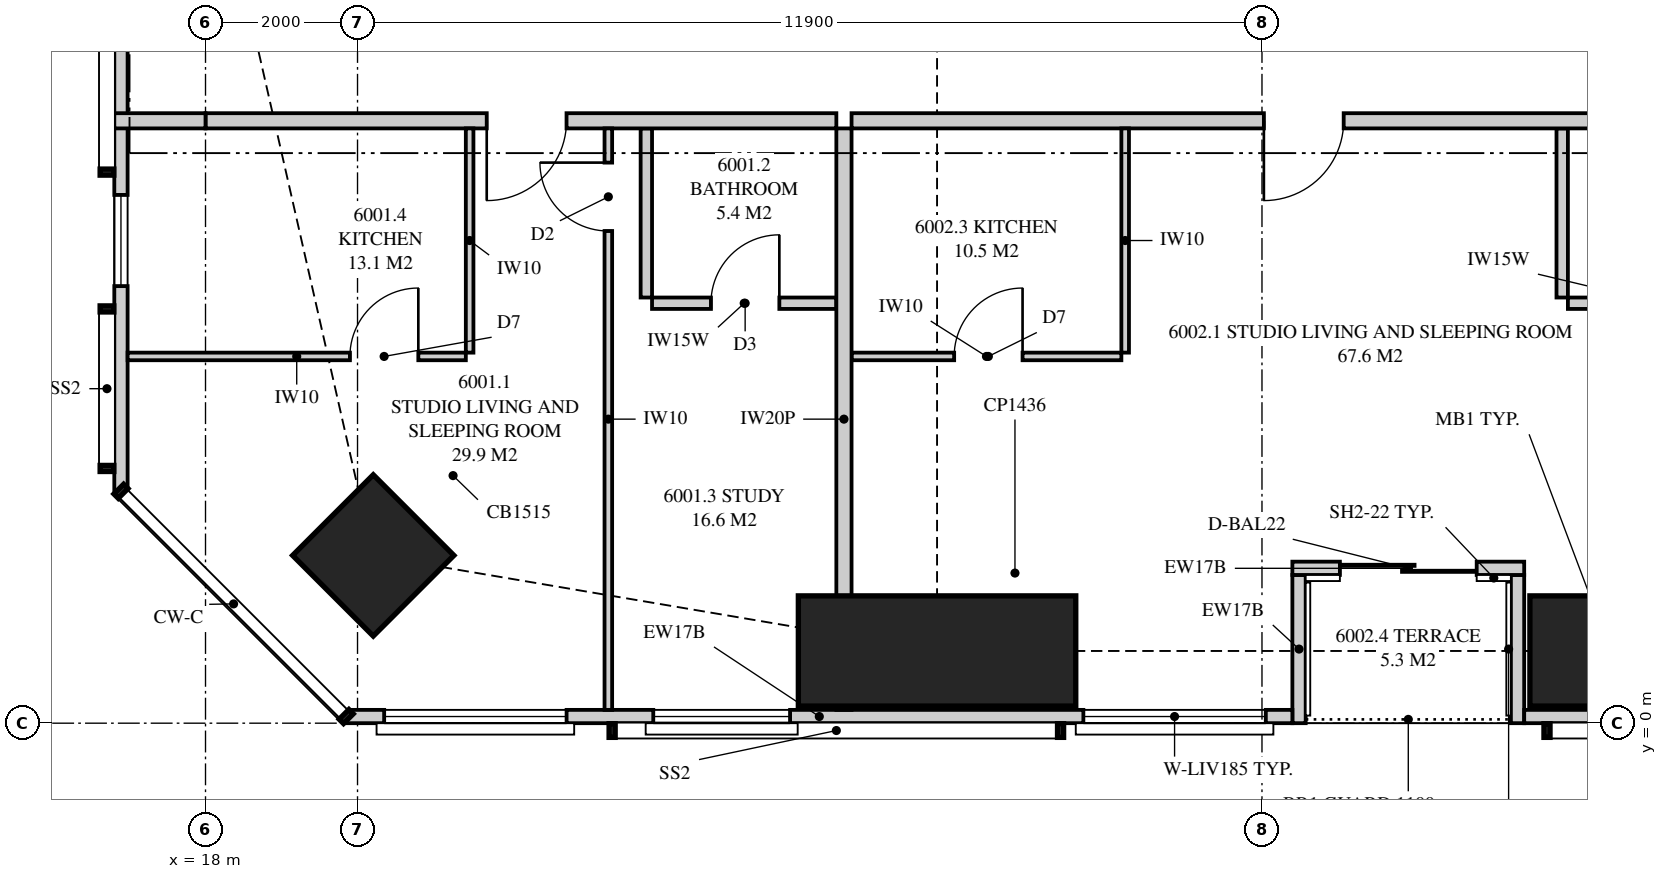
"""IFC4 building model, lengths in metres.
Left out: names, types, materials, properties, quantities, classifications, styles, units other than length and angle.
Written with IfcOpenShell. Run it as: python <this file> out.ifc"""

import sys

from ifc_helpers import new_model, si_unit, direction, frame, frame_2d, origin, origin_2d, place, context, subcontext, project, spatial, polyline, rectangle, hollow_rectangle, outline, extrude, element, fill, save


model = new_model("IFC4")
c1 = context("Model", 3, precision=1e-05, world=origin(), true_north=direction((0.0, 1.0)))
c2 = subcontext(c1, "Body", "Model", "MODEL_VIEW")
j1 = project(units=[si_unit("LENGTHUNIT", "METRE"), si_unit("PLANEANGLEUNIT", "RADIAN")], contexts=[c1])
p1 = place(None, origin())
s1 = spatial("IfcSite", under=j1, at=p1, CompositionType="ELEMENT")
p2 = place(p1, origin())
s2 = spatial("IfcBuilding", under=s1, at=p2, CompositionType="ELEMENT")
p3 = place(p2, frame((0.0, 0.0, 221.45)))
s3 = spatial("IfcBuildingStorey", under=s2, at=p3, CompositionType="ELEMENT", Elevation=221.45)
p4 = place(p3, frame((20.207, 2.207, 0.0), z_axis=(0.0, 0.0, 1.0), x_axis=(0.707106781187, 0.707106781187, 0.0)))
e1 = element("IfcColumn", 1, at=p4, inside=s3, PredefinedType="COLUMN", context=c2, shape_type="SweptSolid", body=[
    extrude(hollow_rectangle(XDim=1.5, YDim=1.5, WallThickness=0.125, at=origin_2d()), origin(), (0.0, 0.0, 1.0), 3.5),
])
for number, where, z_axis, x_axis in (
    (2, (27.625, 0.95, 0.0), (0.0, 0.0, 1.0), (0.0, 1.0, 0.0)),
    (3, (37.25, 0.95, 0.0), (0.0, 0.0, 1.0), (0.0, 1.0, 0.0)),
):
    element("IfcColumn", number, at=place(p3, frame(where, z_axis=z_axis, x_axis=x_axis)), inside=s3, PredefinedType="COLUMN", context=c2, shape_type="SweptSolid", body=[
        extrude(rectangle(XDim=1.45, YDim=3.65, at=origin_2d()), origin(), (0.0, 0.0, 1.0), 3.5),
    ])
p5 = place(p3, frame((19.851, 0.087, 0.0), z_axis=(0.0, 0.0, 1.0), x_axis=(1.0, 0.0, 0.0)))
e4 = element("IfcWall", 4, at=p5, inside=s3, PredefinedType="SOLIDWALL", context=c2, shape_type="SweptSolid", body=[
    extrude(outline(polyline([(0.0, 0.0), (12.449, 0.0), (12.449, 2.3), (7.774, 2.3), (7.774, 3.26), (7.642, 3.26), (7.642, 2.3), (7.559, 2.3), (7.559, 3.26), (0.0, 3.26), (0.0, 0.0)])), frame((0.0, 0.087, 0.0), z_axis=(0.0, -1.0, 0.0), x_axis=(1.0, 0.0, 0.0)), (0.0, 0.0, 1.0), 0.175),
])
p6 = place(p5, frame((0.5, 0.0, 0.4)))
e5 = element("IfcOpeningElement", 5, at=p6, cuts=e4, PredefinedType="OPENING", context=c2, shape_type="SweptSolid", body=[
    extrude(rectangle(XDim=2.4, YDim=1.85, at=frame_2d((1.2, 0.925))), frame((0.0, 0.097, 0.0), z_axis=(0.0, -1.0, 0.0), x_axis=(1.0, 0.0, 0.0)), (0.0, 0.0, 1.0), 0.195),
])
p7 = place(p5, frame((4.04, 0.0, 0.4)))
e6 = element("IfcOpeningElement", 6, at=p7, cuts=e4, PredefinedType="OPENING", context=c2, shape_type="SweptSolid", body=[
    extrude(rectangle(XDim=1.8, YDim=1.85, at=frame_2d((0.9, 0.925))), frame((0.0, 0.097, 0.0), z_axis=(0.0, -1.0, 0.0), x_axis=(1.0, 0.0, 0.0)), (0.0, 0.0, 1.0), 0.195),
])
p8 = place(p5, frame((9.699, 0.0, 0.4)))
e7 = element("IfcOpeningElement", 7, at=p8, cuts=e4, PredefinedType="OPENING", context=c2, shape_type="SweptSolid", body=[
    extrude(rectangle(XDim=2.4, YDim=1.85, at=frame_2d((1.2, 0.925))), frame((0.0, 0.097, 0.0), z_axis=(0.0, -1.0, 0.0), x_axis=(1.0, 0.0, 0.0)), (0.0, 0.0, 1.0), 0.195),
])
p9 = place(p3, frame((35.35, 0.087, 0.0), z_axis=(0.0, 0.0, 1.0), x_axis=(1.0, 0.0, 0.0)))
e8 = element("IfcWall", 8, at=p9, inside=s3, PredefinedType="SOLIDWALL", context=c2, shape_type="SweptSolid", body=[
    extrude(outline(polyline([(0.0, 0.0), (18.099, 0.0), (18.099, 3.26), (11.74, 3.26), (11.74, 2.3), (11.656, 2.3), (11.656, 3.26), (11.525, 3.26), (11.525, 2.3), (0.0, 2.3), (0.0, 0.0)])), frame((0.0, 0.087, 0.0), z_axis=(0.0, -1.0, 0.0), x_axis=(1.0, 0.0, 0.0)), (0.0, 0.0, 1.0), 0.175),
])
p10 = place(p9, frame((4.0, 0.0, 0.4)))
e9 = element("IfcOpeningElement", 9, at=p10, cuts=e8, PredefinedType="OPENING", context=c2, shape_type="SweptSolid", body=[
    extrude(rectangle(XDim=1.8, YDim=1.85, at=frame_2d((0.9, 0.925))), frame((0.0, 0.097, 0.0), z_axis=(0.0, -1.0, 0.0), x_axis=(1.0, 0.0, 0.0)), (0.0, 0.0, 1.0), 0.195),
])
p11 = place(p9, frame((7.6, 0.0, 0.4)))
e10 = element("IfcOpeningElement", 10, at=p11, cuts=e8, PredefinedType="OPENING", context=c2, shape_type="SweptSolid", body=[
    extrude(rectangle(XDim=1.8, YDim=1.85, at=frame_2d((0.9, 0.925))), frame((0.0, 0.097, 0.0), z_axis=(0.0, -1.0, 0.0), x_axis=(1.0, 0.0, 0.0)), (0.0, 0.0, 1.0), 0.195),
])
p12 = place(p9, frame((13.51, 0.0, 0.4)))
e11 = element("IfcOpeningElement", 11, at=p12, cuts=e8, PredefinedType="OPENING", context=c2, shape_type="SweptSolid", body=[
    extrude(rectangle(XDim=2.4, YDim=1.85, at=frame_2d((1.2, 0.925))), frame((0.0, 0.097, 0.0), z_axis=(0.0, -1.0, 0.0), x_axis=(1.0, 0.0, 0.0)), (0.0, 0.0, 1.0), 0.195),
])
p13 = place(p3, frame((32.3, 2.038, 0.0), z_axis=(0.0, 0.0, 1.0), x_axis=(1.0, 0.0, 0.0)))
e12 = element("IfcWall", 12, at=p13, inside=s3, PredefinedType="SOLIDWALL", context=c2, shape_type="SweptSolid", body=[
    extrude(rectangle(XDim=3.05, YDim=0.175, at=frame_2d((1.525, 0.0))), origin(), (0.0, 0.0, 1.0), 3.26),
])
p14 = place(p13, frame((0.625, 0.0, 0.0)))
e13 = element("IfcOpeningElement", 13, at=p14, cuts=e12, PredefinedType="OPENING", context=c2, shape_type="SweptSolid", body=[
    extrude(rectangle(XDim=1.8, YDim=2.25, at=frame_2d((0.9, 1.125))), frame((0.0, 0.097, 0.0), z_axis=(0.0, -1.0, 0.0), x_axis=(1.0, 0.0, 0.0)), (0.0, 0.0, 1.0), 0.195),
])
for number, where, z_axis, x_axis in (
    (14, (32.387, 0.0, 0.0), (0.0, 0.0, 1.0), (0.0, 1.0, 0.0)),
    (15, (35.262, 0.0, 0.0), (0.0, 0.0, 1.0), (0.0, 1.0, 0.0)),
):
    element("IfcWall", number, at=place(p3, frame(where, z_axis=z_axis, x_axis=x_axis)), inside=s3, PredefinedType="SOLIDWALL", context=c2, shape_type="SweptSolid", body=[
        extrude(outline(polyline([(0.0, 0.0), (1.95, 0.0), (1.95, 3.26), (1.75, 3.26), (1.75, 2.3), (0.15, 2.3), (0.15, 3.26), (0.0, 3.26), (0.0, 0.0)])), frame((0.0, 0.087, 0.0), z_axis=(0.0, -1.0, 0.0), x_axis=(1.0, 0.0, 0.0)), (0.0, 0.0, 1.0), 0.175),
    ])
p15 = place(p3, frame((16.887, 30.949, 0.0), z_axis=(0.0, 0.0, 1.0), x_axis=(0.0, -1.0, 0.0)))
e16 = element("IfcWall", 16, at=p15, inside=s3, PredefinedType="SOLIDWALL", context=c2, shape_type="SweptSolid", body=[
    extrude(outline(polyline([(0.0, 0.0), (27.897, 0.0), (27.897, 3.26), (18.148, 3.26), (18.148, 2.3), (18.125, 2.3), (18.125, 3.26), (17.949, 3.26), (17.949, 2.3), (5.949, 2.3), (5.949, 3.26), (0.0, 3.26), (0.0, 0.0)])), frame((0.0, 0.087, 0.0), z_axis=(0.0, -1.0, 0.0), x_axis=(1.0, 0.0, 0.0)), (0.0, 0.0, 1.0), 0.175),
])
p16 = place(p15, frame((11.849, 0.0, 0.4)))
e17 = element("IfcOpeningElement", 17, at=p16, cuts=e16, PredefinedType="OPENING", context=c2, shape_type="SweptSolid", body=[
    extrude(rectangle(XDim=1.2, YDim=1.85, at=frame_2d((0.6, 0.925))), frame((0.0, 0.097, 0.0), z_axis=(0.0, -1.0, 0.0), x_axis=(1.0, 0.0, 0.0)), (0.0, 0.0, 1.0), 0.195),
])
p17 = place(p15, frame((23.999, 0.0, 0.4)))
e18 = element("IfcOpeningElement", 18, at=p17, cuts=e16, PredefinedType="OPENING", context=c2, shape_type="SweptSolid", body=[
    extrude(rectangle(XDim=1.2, YDim=1.85, at=frame_2d((0.6, 0.925))), frame((0.0, 0.097, 0.0), z_axis=(0.0, -1.0, 0.0), x_axis=(1.0, 0.0, 0.0)), (0.0, 0.0, 1.0), 0.195),
])
p18 = place(p3, frame((26.4, 0.175, 0.0), z_axis=(0.0, 0.0, 1.0), x_axis=(0.0, 1.0, 0.0)))
e19 = element("IfcWall", 19, at=p18, inside=s3, PredefinedType="PARTITIONING", context=c2, shape_type="SweptSolid", body=[
    extrude(outline(polyline([(0.06, 3.26), (0.0, 3.26), (0.0, 0.0), (0.529, 0.0), (0.529, 0.31), (1.021, 0.31), (1.021, 0.0), (7.65, 0.0), (7.65, 2.66), (1.906, 2.66), (1.906, 2.3), (1.021, 2.3), (1.021, 1.99), (0.529, 1.99), (0.529, 2.3), (0.06, 2.3), (0.06, 3.26)])), frame((0.0, 0.1, 0.0), z_axis=(0.0, -1.0, 0.0), x_axis=(1.0, 0.0, 0.0)), (0.0, 0.0, 1.0), 0.2),
])
p19 = place(p3, frame((18.0, 7.925, 0.0), z_axis=(0.0, 0.0, 1.0), x_axis=(1.0, 0.0, 0.0)))
e20 = element("IfcWall", 20, at=p19, inside=s3, PredefinedType="PARTITIONING", context=c2, shape_type="SweptSolid", body=[
    extrude(outline(polyline([(0.0, 0.0), (8.3, 0.0), (8.3, 3.26), (1.839, 3.26), (1.839, 2.3), (0.0, 2.3), (0.0, 3.26), (0.0, 0.0)])), frame((0.0, 0.1, 0.0), z_axis=(0.0, -1.0, 0.0), x_axis=(1.0, 0.0, 0.0)), (0.0, 0.0, 1.0), 0.2),
])
p20 = place(p19, frame((3.7, 0.0, 0.0)))
e21 = element("IfcOpeningElement", 21, at=p20, cuts=e20, PredefinedType="OPENING", context=c2, shape_type="SweptSolid", body=[
    extrude(rectangle(XDim=1.05, YDim=2.2, at=frame_2d((0.525, 1.1))), frame((0.0, 0.11, 0.0), z_axis=(0.0, -1.0, 0.0), x_axis=(1.0, 0.0, 0.0)), (0.0, 0.0, 1.0), 0.22),
])
p21 = place(p3, frame((23.875, 5.525, 0.0), z_axis=(0.0, 0.0, 1.0), x_axis=(1.0, 0.0, 0.0)))
e22 = element("IfcWall", 22, at=p21, inside=s3, PredefinedType="PLUMBINGWALL", context=c2, shape_type="SweptSolid", body=[
    extrude(rectangle(XDim=2.425, YDim=0.15, at=frame_2d((1.212, 0.0))), origin(), (0.0, 0.0, 1.0), 3.26),
])
p22 = place(p21, frame((0.775, 0.0, 0.0)))
e23 = element("IfcOpeningElement", 23, at=p22, cuts=e22, PredefinedType="OPENING", context=c2, shape_type="SweptSolid", body=[
    extrude(rectangle(XDim=0.9, YDim=2.1, at=frame_2d((0.45, 1.05))), frame((0.0, 0.085, 0.0), z_axis=(0.0, -1.0, 0.0), x_axis=(1.0, 0.0, 0.0)), (0.0, 0.0, 1.0), 0.17),
])
p23 = place(p3, frame((23.8, 5.6, 0.0), z_axis=(0.0, 0.0, 1.0), x_axis=(0.0, 1.0, 0.0)))
e24 = element("IfcWall", 24, at=p23, inside=s3, PredefinedType="PLUMBINGWALL", context=c2, shape_type="SweptSolid", body=[
    extrude(rectangle(XDim=2.225, YDim=0.15, at=frame_2d((1.112, 0.0))), origin(), (0.0, 0.0, 1.0), 3.26),
])
p24 = place(p3, frame((23.3, 0.175, 0.0), z_axis=(0.0, 0.0, 1.0), x_axis=(0.0, 1.0, 0.0)))
e25 = element("IfcWall", 25, at=p24, inside=s3, PredefinedType="PARTITIONING", context=c2, shape_type="SweptSolid", body=[
    extrude(outline(polyline([(0.0, 0.0), (7.65, 0.0), (7.65, 3.26), (2.38, 3.26), (2.38, 2.3), (0.636, 2.3), (0.636, 3.26), (0.0, 3.26), (0.0, 0.0)])), frame((0.0, 0.05, 0.0), z_axis=(0.0, -1.0, 0.0), x_axis=(1.0, 0.0, 0.0)), (0.0, 0.0, 1.0), 0.1),
])
p25 = place(p24, frame((6.3, 0.0, 0.0)))
e26 = element("IfcOpeningElement", 26, at=p25, cuts=e25, PredefinedType="OPENING", context=c2, shape_type="SweptSolid", body=[
    extrude(rectangle(XDim=0.9, YDim=2.1, at=frame_2d((0.45, 1.05))), frame((0.0, 0.06, 0.0), z_axis=(0.0, -1.0, 0.0), x_axis=(1.0, 0.0, 0.0)), (0.0, 0.0, 1.0), 0.12),
])
p26 = place(p3, frame((16.975, 4.825, 0.0), z_axis=(0.0, 0.0, 1.0), x_axis=(1.0, 0.0, 0.0)))
e27 = element("IfcWall", 27, at=p26, inside=s3, PredefinedType="PARTITIONING", context=c2, shape_type="SweptSolid", body=[
    extrude(outline(polyline([(0.0, 0.0), (4.45, 0.0), (4.45, 3.26), (3.518, 3.26), (3.518, 2.3), (1.754, 2.3), (1.754, 3.26), (0.0, 3.26), (0.0, 0.0)])), frame((0.0, 0.05, 0.0), z_axis=(0.0, -1.0, 0.0), x_axis=(1.0, 0.0, 0.0)), (0.0, 0.0, 1.0), 0.1),
])
p27 = place(p26, frame((2.925, 0.0, 0.0)))
e28 = element("IfcOpeningElement", 28, at=p27, cuts=e27, PredefinedType="OPENING", context=c2, shape_type="SweptSolid", body=[
    extrude(rectangle(XDim=0.9, YDim=2.1, at=frame_2d((0.45, 1.05))), frame((0.0, 0.06, 0.0), z_axis=(0.0, -1.0, 0.0), x_axis=(1.0, 0.0, 0.0)), (0.0, 0.0, 1.0), 0.12),
])
p28 = place(p3, frame((21.475, 4.875, 0.0), z_axis=(0.0, 0.0, 1.0), x_axis=(0.0, 1.0, 0.0)))
e29 = element("IfcWall", 29, at=p28, inside=s3, PredefinedType="PARTITIONING", context=c2, shape_type="SweptSolid", body=[
    extrude(rectangle(XDim=2.95, YDim=0.1, at=frame_2d((1.475, 0.0))), origin(), (0.0, 0.0, 1.0), 3.26),
])
p29 = place(p3, frame((26.5, 7.925, 0.0), z_axis=(0.0, 0.0, 1.0), x_axis=(1.0, 0.0, 0.0)))
e30 = element("IfcWall", 30, at=p29, inside=s3, PredefinedType="PARTITIONING", context=c2, shape_type="SweptSolid", body=[
    extrude(outline(polyline([(0.0, 0.0), (11.85, 0.0), (11.85, 3.26), (11.85, 2.66), (9.44, 2.66), (9.44, 3.26), (2.435, 3.26), (2.435, 2.66), (0.0, 2.66), (0.0, 3.26), (0.0, 0.0)])), frame((0.0, 0.1, 0.0), z_axis=(0.0, -1.0, 0.0), x_axis=(1.0, 0.0, 0.0)), (0.0, 0.0, 1.0), 0.2),
])
p30 = place(p29, frame((5.425, 0.0, 0.0)))
e31 = element("IfcOpeningElement", 31, at=p30, cuts=e30, PredefinedType="OPENING", context=c2, shape_type="SweptSolid", body=[
    extrude(rectangle(XDim=1.05, YDim=2.2, at=frame_2d((0.525, 1.1))), frame((0.0, 0.11, 0.0), z_axis=(0.0, -1.0, 0.0), x_axis=(1.0, 0.0, 0.0)), (0.0, 0.0, 1.0), 0.22),
])
p31 = place(p3, frame((35.925, 5.525, 0.0), z_axis=(0.0, 0.0, 1.0), x_axis=(1.0, 0.0, 0.0)))
e32 = element("IfcWall", 32, at=p31, inside=s3, PredefinedType="PLUMBINGWALL", context=c2, shape_type="SweptSolid", body=[
    extrude(outline(polyline([(0.0, 0.0), (2.425, 0.0), (2.425, 3.26), (2.425, 2.66), (0.04, 2.66), (0.04, 3.26), (0.0, 3.26), (0.0, 0.0)])), frame((0.0, 0.075, 0.0), z_axis=(0.0, -1.0, 0.0), x_axis=(1.0, 0.0, 0.0)), (0.0, 0.0, 1.0), 0.15),
])
p32 = place(p31, frame((0.775, 0.0, 0.0)))
e33 = element("IfcOpeningElement", 33, at=p32, cuts=e32, PredefinedType="OPENING", context=c2, shape_type="SweptSolid", body=[
    extrude(rectangle(XDim=0.9, YDim=2.1, at=frame_2d((0.45, 1.05))), frame((0.0, 0.085, 0.0), z_axis=(0.0, -1.0, 0.0), x_axis=(1.0, 0.0, 0.0)), (0.0, 0.0, 1.0), 0.17),
])
p33 = place(p3, frame((35.85, 5.6, 0.0), z_axis=(0.0, 0.0, 1.0), x_axis=(0.0, 1.0, 0.0)))
e34 = element("IfcWall", 34, at=p33, inside=s3, PredefinedType="PLUMBINGWALL", context=c2, shape_type="SweptSolid", body=[
    extrude(rectangle(XDim=2.225, YDim=0.15, at=frame_2d((1.112, 0.0))), origin(), (0.0, 0.0, 1.0), 3.26),
])
p34 = place(p3, frame((26.5, 4.825, 0.0), z_axis=(0.0, 0.0, 1.0), x_axis=(1.0, 0.0, 0.0)))
e35 = element("IfcWall", 35, at=p34, inside=s3, PredefinedType="PARTITIONING", context=c2, shape_type="SweptSolid", body=[
    extrude(outline(polyline([(0.0, 0.0), (3.55, 0.0), (3.55, 3.26), (2.385, 3.26), (2.385, 2.66), (0.0, 2.66), (0.0, 3.26), (0.0, 0.0)])), frame((0.0, 0.05, 0.0), z_axis=(0.0, -1.0, 0.0), x_axis=(1.0, 0.0, 0.0)), (0.0, 0.0, 1.0), 0.1),
])
p35 = place(p34, frame((1.35, 0.0, 0.0)))
e36 = element("IfcOpeningElement", 36, at=p35, cuts=e35, PredefinedType="OPENING", context=c2, shape_type="SweptSolid", body=[
    extrude(rectangle(XDim=0.9, YDim=2.1, at=frame_2d((0.45, 1.05))), frame((0.0, 0.06, 0.0), z_axis=(0.0, -1.0, 0.0), x_axis=(1.0, 0.0, 0.0)), (0.0, 0.0, 1.0), 0.12),
])
p36 = place(p3, frame((30.1, 4.875, 0.0), z_axis=(0.0, 0.0, 1.0), x_axis=(0.0, 1.0, 0.0)))
e37 = element("IfcWall", 37, at=p36, inside=s3, PredefinedType="PARTITIONING", context=c2, shape_type="SweptSolid", body=[
    extrude(rectangle(XDim=2.95, YDim=0.1, at=frame_2d((1.475, 0.0))), origin(), (0.0, 0.0, 1.0), 3.26),
])
p37 = place(p3, frame((16.8, 7.925, 0.0), z_axis=(0.0, 0.0, 1.0), x_axis=(1.0, 0.0, 0.0)))
e38 = element("IfcWall", 38, at=p37, inside=s3, PredefinedType="PARTITIONING", context=c2, shape_type="SweptSolid", body=[
    extrude(outline(polyline([(0.0, 0.0), (1.2, 0.0), (1.2, 3.26), (1.2, 2.3), (1.172, 2.3), (1.172, 3.26), (0.0, 3.26), (0.0, 0.0)])), frame((0.0, 0.1, 0.0), z_axis=(0.0, -1.0, 0.0), x_axis=(1.0, 0.0, 0.0)), (0.0, 0.0, 1.0), 0.2),
])
p38 = place(p6, origin())
e39 = element("IfcWindow", 39, at=p38, inside=s3, PartitioningType="SINGLE_PANEL", PredefinedType="WINDOW", context=c2, shape_type="SweptSolid", body=[
    extrude(rectangle(XDim=2.4, YDim=1.85, at=frame_2d((1.2, 0.925))), frame((0.0, 0.03, 0.0), z_axis=(0.0, -1.0, 0.0), x_axis=(1.0, 0.0, 0.0)), (0.0, 0.0, 1.0), 0.06),
])
fill(e5, e39)
p39 = place(p7, origin())
e40 = element("IfcWindow", 40, at=p39, inside=s3, PartitioningType="SINGLE_PANEL", PredefinedType="WINDOW", context=c2, shape_type="SweptSolid", body=[
    extrude(rectangle(XDim=1.8, YDim=1.85, at=frame_2d((0.9, 0.925))), frame((0.0, 0.03, 0.0), z_axis=(0.0, -1.0, 0.0), x_axis=(1.0, 0.0, 0.0)), (0.0, 0.0, 1.0), 0.06),
])
fill(e6, e40)
p40 = place(p14, origin())
e41 = element("IfcDoor", 41, at=p40, inside=s3, OperationType="SLIDING_TO_LEFT", PredefinedType="DOOR", context=c2, shape_type="SweptSolid", body=[
    extrude(rectangle(XDim=1.8, YDim=2.25, at=frame_2d((0.9, 1.125))), frame((0.0, 0.025, 0.0), z_axis=(0.0, -1.0, 0.0), x_axis=(1.0, 0.0, 0.0)), (0.0, 0.0, 1.0), 0.05),
])
fill(e13, e41)
p41 = place(p8, origin())
e42 = element("IfcWindow", 42, at=p41, inside=s3, PartitioningType="SINGLE_PANEL", PredefinedType="WINDOW", context=c2, shape_type="SweptSolid", body=[
    extrude(rectangle(XDim=2.4, YDim=1.85, at=frame_2d((1.2, 0.925))), frame((0.0, 0.03, 0.0), z_axis=(0.0, -1.0, 0.0), x_axis=(1.0, 0.0, 0.0)), (0.0, 0.0, 1.0), 0.06),
])
fill(e7, e42)
p42 = place(p17, origin())
e43 = element("IfcWindow", 43, at=p42, inside=s3, PartitioningType="SINGLE_PANEL", PredefinedType="WINDOW", context=c2, shape_type="SweptSolid", body=[
    extrude(rectangle(XDim=1.2, YDim=1.85, at=frame_2d((0.6, 0.925))), frame((0.0, 0.03, 0.0), z_axis=(0.0, -1.0, 0.0), x_axis=(1.0, 0.0, 0.0)), (0.0, 0.0, 1.0), 0.06),
])
fill(e18, e43)
p43 = place(p20, frame((1.05, 0.0, 0.0), z_axis=(0.0, 0.0, 1.0), x_axis=(-1.0, 0.0, 0.0)))
e44 = element("IfcDoor", 44, at=p43, inside=s3, OperationType="SINGLE_SWING_RIGHT", PredefinedType="DOOR", context=c2, shape_type="SweptSolid", body=[
    extrude(rectangle(XDim=1.05, YDim=2.2, at=frame_2d((0.525, 1.1))), frame((0.0, 0.025, 0.0), z_axis=(0.0, -1.0, 0.0), x_axis=(1.0, 0.0, 0.0)), (0.0, 0.0, 1.0), 0.05),
])
fill(e21, e44)
p44 = place(p22, origin())
e45 = element("IfcDoor", 45, at=p44, inside=s3, OperationType="SINGLE_SWING_RIGHT", PredefinedType="DOOR", context=c2, shape_type="SweptSolid", body=[
    extrude(rectangle(XDim=0.9, YDim=2.1, at=frame_2d((0.45, 1.05))), frame((0.0, 0.025, 0.0), z_axis=(0.0, -1.0, 0.0), x_axis=(1.0, 0.0, 0.0)), (0.0, 0.0, 1.0), 0.05),
])
fill(e23, e45)
p45 = place(p25, origin())
e46 = element("IfcDoor", 46, at=p45, inside=s3, OperationType="SINGLE_SWING_RIGHT", PredefinedType="DOOR", context=c2, shape_type="SweptSolid", body=[
    extrude(rectangle(XDim=0.9, YDim=2.1, at=frame_2d((0.45, 1.05))), frame((0.0, 0.025, 0.0), z_axis=(0.0, -1.0, 0.0), x_axis=(1.0, 0.0, 0.0)), (0.0, 0.0, 1.0), 0.05),
])
fill(e26, e46)
p46 = place(p27, origin())
e47 = element("IfcDoor", 47, at=p46, inside=s3, OperationType="SINGLE_SWING_RIGHT", PredefinedType="DOOR", context=c2, shape_type="SweptSolid", body=[
    extrude(rectangle(XDim=0.9, YDim=2.1, at=frame_2d((0.45, 1.05))), frame((0.0, 0.025, 0.0), z_axis=(0.0, -1.0, 0.0), x_axis=(1.0, 0.0, 0.0)), (0.0, 0.0, 1.0), 0.05),
])
fill(e28, e47)
p47 = place(p30, frame((1.05, 0.0, 0.0), z_axis=(0.0, 0.0, 1.0), x_axis=(-1.0, 0.0, 0.0)))
e48 = element("IfcDoor", 48, at=p47, inside=s3, OperationType="SINGLE_SWING_RIGHT", PredefinedType="DOOR", context=c2, shape_type="SweptSolid", body=[
    extrude(rectangle(XDim=1.05, YDim=2.2, at=frame_2d((0.525, 1.1))), frame((0.0, 0.025, 0.0), z_axis=(0.0, -1.0, 0.0), x_axis=(1.0, 0.0, 0.0)), (0.0, 0.0, 1.0), 0.05),
])
fill(e31, e48)
p48 = place(p35, origin())
e49 = element("IfcDoor", 49, at=p48, inside=s3, OperationType="SINGLE_SWING_RIGHT", PredefinedType="DOOR", context=c2, shape_type="SweptSolid", body=[
    extrude(rectangle(XDim=0.9, YDim=2.1, at=frame_2d((0.45, 1.05))), frame((0.0, 0.025, 0.0), z_axis=(0.0, -1.0, 0.0), x_axis=(1.0, 0.0, 0.0)), (0.0, 0.0, 1.0), 0.05),
])
fill(e36, e49)
save(model, sys.argv[1])
